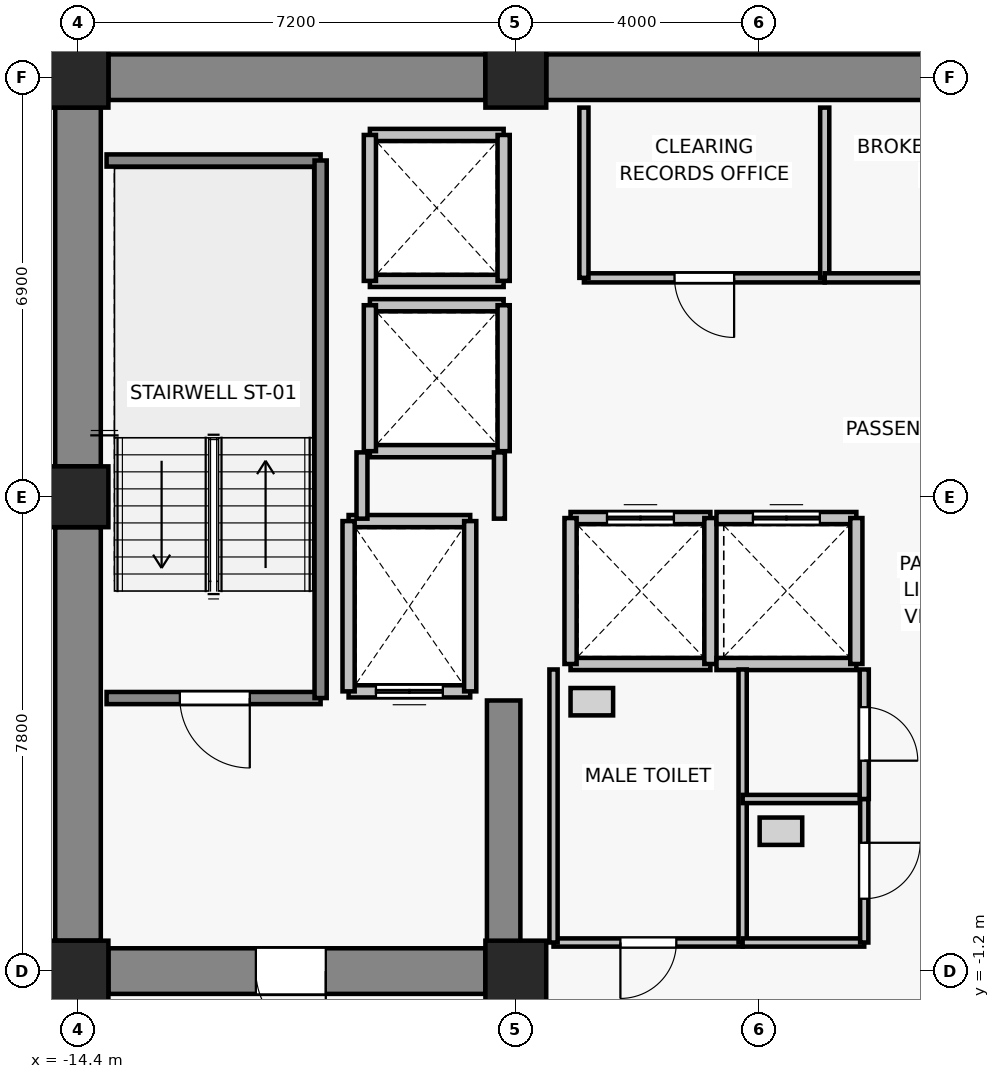
"""IFC4 building model, lengths in metres.
Left out: names, types, materials, properties, quantities, classifications, styles, units other than length and angle.
Written with IfcOpenShell. Run it as: python <this file> out.ifc"""

import sys

from ifc_helpers import new_model, si_unit, direction, frame, frame_2d, origin, origin_2d, place, context, subcontext, project, spatial, rectangle, extrude, source, transform, mapped, element, fill, save


model = new_model("IFC4")
c1 = context("Model", 3, precision=1e-05, world=origin(), true_north=direction((0.0, 1.0)))
c2 = subcontext(c1, "Body", "Model", "MODEL_VIEW")
j1 = project(units=[si_unit("LENGTHUNIT", "METRE"), si_unit("PLANEANGLEUNIT", "RADIAN")], contexts=[c1])
p1 = place(None, origin())
s1 = spatial("IfcSite", under=j1, at=p1, CompositionType="ELEMENT")
p2 = place(p1, origin())
s2 = spatial("IfcBuilding", under=s1, at=p2, CompositionType="ELEMENT")
p3 = place(p2, frame((0.0, 0.0, 119.8)))
s3 = spatial("IfcBuildingStorey", under=s2, at=p3, CompositionType="ELEMENT", Elevation=119.8)
for number, where, z_axis, x_axis in (
    (1, (-14.4, -1.2, 0.0), (0.0, 0.0, 1.0), (1.0, 0.0, 0.0)),
    (2, (-7.2, -1.2, 0.0), (0.0, 0.0, 1.0), (1.0, 0.0, 0.0)),
    (3, (-14.4, 6.6, 0.0), (0.0, 0.0, 1.0), (1.0, 0.0, 0.0)),
    (4, (-14.4, 13.5, 0.0), (0.0, 0.0, 1.0), (1.0, 0.0, 0.0)),
    (5, (-7.2, 13.5, 0.0), (0.0, 0.0, 1.0), (1.0, 0.0, 0.0)),
):
    element("IfcColumn", number, at=place(p3, frame(where, z_axis=z_axis, x_axis=x_axis)), inside=s3, PredefinedType="COLUMN", context=c2, shape_type="SweptSolid", body=[
        extrude(rectangle(XDim=1.0, YDim=1.0, at=origin_2d()), origin(), (0.0, 0.0, 1.0), 3.3),
    ])
p4 = place(p3, frame((-13.9, 13.5, 0.0), z_axis=(0.0, 0.0, 1.0), x_axis=(1.0, 0.0, 0.0)))
e6 = element("IfcWall", 6, at=p4, inside=s3, PredefinedType="SHEAR", context=c2, shape_type="SweptSolid", body=[
    extrude(rectangle(XDim=6.2, YDim=0.75, at=frame_2d((3.1, 0.0))), origin(), (0.0, 0.0, 1.0), 3.075),
])
p5 = place(p3, frame((-6.7, 13.5, 0.0), z_axis=(0.0, 0.0, 1.0), x_axis=(1.0, 0.0, 0.0)))
e7 = element("IfcWall", 7, at=p5, inside=s3, PredefinedType="SHEAR", context=c2, shape_type="SweptSolid", body=[
    extrude(rectangle(XDim=13.4, YDim=0.75, at=frame_2d((6.7, 0.0))), origin(), (0.0, 0.0, 1.0), 3.075),
])
p6 = place(p3, frame((-14.4, -0.7, 0.0), z_axis=(0.0, 0.0, 1.0), x_axis=(0.0, 1.0, 0.0)))
e8 = element("IfcWall", 8, at=p6, inside=s3, PredefinedType="SHEAR", context=c2, shape_type="SweptSolid", body=[
    extrude(rectangle(XDim=6.8, YDim=0.75, at=frame_2d((3.4, 0.0))), origin(), (0.0, 0.0, 1.0), 3.075),
])
p7 = place(p3, frame((-14.4, 7.1, 0.0), z_axis=(0.0, 0.0, 1.0), x_axis=(0.0, 1.0, 0.0)))
e9 = element("IfcWall", 9, at=p7, inside=s3, PredefinedType="SHEAR", context=c2, shape_type="SweptSolid", body=[
    extrude(rectangle(XDim=5.9, YDim=0.75, at=frame_2d((2.95, 0.0))), origin(), (0.0, 0.0, 1.0), 3.075),
])
p8 = place(p3, frame((-7.7, -1.2, 0.0), z_axis=(0.0, 0.0, 1.0), x_axis=(-1.0, 0.0, 0.0)))
e10 = element("IfcWall", 10, at=p8, inside=s3, PredefinedType="SHEAR", context=c2, shape_type="SweptSolid", body=[
    extrude(rectangle(XDim=6.2, YDim=0.75, at=frame_2d((3.1, 0.0))), origin(), (0.0, 0.0, 1.0), 3.075),
])
p9 = place(p8, frame((2.625, 0.0, 0.0)))
e11 = element("IfcOpeningElement", 11, at=p9, cuts=e10, PredefinedType="OPENING", context=c2, shape_type="SweptSolid", body=[
    extrude(rectangle(XDim=1.15, YDim=2.15, at=frame_2d((0.575, 1.075))), frame((0.0, 0.385, 0.0), z_axis=(0.0, -1.0, 0.0), x_axis=(1.0, 0.0, 0.0)), (0.0, 0.0, 1.0), 0.77),
])
p10 = place(p3, frame((-7.4, -0.825, 0.0), z_axis=(0.0, 0.0, 1.0), x_axis=(0.0, 1.0, 0.0)))
e12 = element("IfcWall", 12, at=p10, inside=s3, PredefinedType="SHEAR", context=c2, shape_type="SweptSolid", body=[
    extrude(rectangle(XDim=4.075, YDim=0.55, at=frame_2d((2.038, 0.0))), origin(), (0.0, 0.0, 1.0), 3.075),
])
p11 = place(p3, frame((-7.95, 3.4, 0.0), z_axis=(0.0, 0.0, 1.0), x_axis=(-1.0, 0.0, 0.0)))
e13 = element("IfcWall", 13, at=p11, inside=s3, PredefinedType="SOLIDWALL", context=c2, shape_type="SweptSolid", body=[
    extrude(rectangle(XDim=2.0, YDim=0.2, at=frame_2d((1.0, 0.0))), origin(), (0.0, 0.0, 1.0), 3.075),
])
p12 = place(p11, frame((0.45, 0.0, 0.0)))
e14 = element("IfcOpeningElement", 14, at=p12, cuts=e13, PredefinedType="OPENING", context=c2, shape_type="SweptSolid", body=[
    extrude(rectangle(XDim=1.1, YDim=2.2, at=frame_2d((0.55, 1.1))), frame((0.0, 0.11, 0.0), z_axis=(0.0, -1.0, 0.0), x_axis=(1.0, 0.0, 0.0)), (0.0, 0.0, 1.0), 0.22),
])
p13 = place(p3, frame((-9.95, 6.2, 0.0), z_axis=(0.0, 0.0, 1.0), x_axis=(1.0, 0.0, 0.0)))
e15 = element("IfcWall", 15, at=p13, inside=s3, PredefinedType="SOLIDWALL", context=c2, shape_type="SweptSolid", body=[
    extrude(rectangle(XDim=2.0, YDim=0.2, at=frame_2d((1.0, 0.0))), origin(), (0.0, 0.0, 1.0), 3.075),
])
for number, where, z_axis, x_axis in (
    (16, (-9.95, 3.4, 0.0), (0.0, 0.0, 1.0), (0.0, 1.0, 0.0)),
    (17, (-7.95, 6.2, 0.0), (0.0, 0.0, 1.0), (0.0, -1.0, 0.0)),
):
    element("IfcWall", number, at=place(p3, frame(where, z_axis=z_axis, x_axis=x_axis)), inside=s3, PredefinedType="SOLIDWALL", context=c2, shape_type="SweptSolid", body=[
        extrude(rectangle(XDim=2.8, YDim=0.2, at=frame_2d((1.4, 0.0))), origin(), (0.0, 0.0, 1.0), 3.075),
    ])
p14 = place(p3, frame((-4.0, 3.85, 0.0), z_axis=(0.0, 0.0, 1.0), x_axis=(-1.0, 0.0, 0.0)))
e18 = element("IfcWall", 18, at=p14, inside=s3, PredefinedType="SOLIDWALL", context=c2, shape_type="SweptSolid", body=[
    extrude(rectangle(XDim=2.3, YDim=0.2, at=frame_2d((1.15, 0.0))), origin(), (0.0, 0.0, 1.0), 3.075),
])
p15 = place(p3, frame((-6.3, 6.25, 0.0), z_axis=(0.0, 0.0, 1.0), x_axis=(1.0, 0.0, 0.0)))
e19 = element("IfcWall", 19, at=p15, inside=s3, PredefinedType="SOLIDWALL", context=c2, shape_type="SweptSolid", body=[
    extrude(rectangle(XDim=2.3, YDim=0.2, at=frame_2d((1.15, 0.0))), origin(), (0.0, 0.0, 1.0), 3.075),
])
p16 = place(p15, frame((0.6, 0.0, 0.0)))
e20 = element("IfcOpeningElement", 20, at=p16, cuts=e19, PredefinedType="OPENING", context=c2, shape_type="SweptSolid", body=[
    extrude(rectangle(XDim=1.1, YDim=2.2, at=frame_2d((0.55, 1.1))), frame((0.0, 0.11, 0.0), z_axis=(0.0, -1.0, 0.0), x_axis=(1.0, 0.0, 0.0)), (0.0, 0.0, 1.0), 0.22),
])
for number, where, z_axis, x_axis in (
    (21, (-6.3, 3.85, 0.0), (0.0, 0.0, 1.0), (0.0, 1.0, 0.0)),
    (22, (-4.0, 6.25, 0.0), (0.0, 0.0, 1.0), (0.0, -1.0, 0.0)),
):
    element("IfcWall", number, at=place(p3, frame(where, z_axis=z_axis, x_axis=x_axis)), inside=s3, PredefinedType="SOLIDWALL", context=c2, shape_type="SweptSolid", body=[
        extrude(rectangle(XDim=2.4, YDim=0.2, at=frame_2d((1.2, 0.0))), origin(), (0.0, 0.0, 1.0), 3.075),
    ])
p17 = place(p3, frame((-1.6, 3.85, 0.0), z_axis=(0.0, 0.0, 1.0), x_axis=(-1.0, 0.0, 0.0)))
e23 = element("IfcWall", 23, at=p17, inside=s3, PredefinedType="SOLIDWALL", context=c2, shape_type="SweptSolid", body=[
    extrude(rectangle(XDim=2.3, YDim=0.2, at=frame_2d((1.15, 0.0))), origin(), (0.0, 0.0, 1.0), 3.075),
])
p18 = place(p3, frame((-3.9, 6.25, 0.0), z_axis=(0.0, 0.0, 1.0), x_axis=(1.0, 0.0, 0.0)))
e24 = element("IfcWall", 24, at=p18, inside=s3, PredefinedType="SOLIDWALL", context=c2, shape_type="SweptSolid", body=[
    extrude(rectangle(XDim=2.3, YDim=0.2, at=frame_2d((1.15, 0.0))), origin(), (0.0, 0.0, 1.0), 3.075),
])
p19 = place(p18, frame((0.6, 0.0, 0.0)))
e25 = element("IfcOpeningElement", 25, at=p19, cuts=e24, PredefinedType="OPENING", context=c2, shape_type="SweptSolid", body=[
    extrude(rectangle(XDim=1.1, YDim=2.2, at=frame_2d((0.55, 1.1))), frame((0.0, 0.11, 0.0), z_axis=(0.0, -1.0, 0.0), x_axis=(1.0, 0.0, 0.0)), (0.0, 0.0, 1.0), 0.22),
])
p20 = place(p3, frame((-1.6, 6.25, 0.0), z_axis=(0.0, 0.0, 1.0), x_axis=(0.0, -1.0, 0.0)))
e26 = element("IfcWall", 26, at=p20, inside=s3, PredefinedType="SOLIDWALL", context=c2, shape_type="SweptSolid", body=[
    extrude(rectangle(XDim=2.4, YDim=0.2, at=frame_2d((1.2, 0.0))), origin(), (0.0, 0.0, 1.0), 3.075),
])
for number, where, z_axis, x_axis in (
    (27, (-7.4, 7.35, 0.0), (0.0, 0.0, 1.0), (-1.0, 0.0, 0.0)),
    (28, (-9.6, 9.75, 0.0), (0.0, 0.0, 1.0), (1.0, 0.0, 0.0)),
):
    element("IfcWall", number, at=place(p3, frame(where, z_axis=z_axis, x_axis=x_axis)), inside=s3, PredefinedType="SOLIDWALL", context=c2, shape_type="SweptSolid", body=[
        extrude(rectangle(XDim=2.2, YDim=0.2, at=frame_2d((1.1, 0.0))), origin(), (0.0, 0.0, 1.0), 2.515),
    ])
p21 = place(p3, frame((-9.6, 7.35, 0.0), z_axis=(0.0, 0.0, 1.0), x_axis=(0.0, 1.0, 0.0)))
e29 = element("IfcWall", 29, at=p21, inside=s3, PredefinedType="SOLIDWALL", context=c2, shape_type="SweptSolid", body=[
    extrude(rectangle(XDim=2.4, YDim=0.2, at=frame_2d((1.2, 0.0))), origin(), (0.0, 0.0, 1.0), 3.075),
])
p22 = place(p3, frame((-7.4, 9.75, 0.0), z_axis=(0.0, 0.0, 1.0), x_axis=(0.0, -1.0, 0.0)))
e30 = element("IfcWall", 30, at=p22, inside=s3, PredefinedType="SOLIDWALL", context=c2, shape_type="SweptSolid", body=[
    extrude(rectangle(XDim=2.4, YDim=0.2, at=frame_2d((1.2, 0.0))), origin(), (0.0, 0.0, 1.0), 2.515),
])
for number, where, z_axis, x_axis in (
    (31, (-7.4, 10.15, 0.0), (0.0, 0.0, 1.0), (-1.0, 0.0, 0.0)),
    (32, (-9.6, 12.55, 0.0), (0.0, 0.0, 1.0), (1.0, 0.0, 0.0)),
):
    element("IfcWall", number, at=place(p3, frame(where, z_axis=z_axis, x_axis=x_axis)), inside=s3, PredefinedType="SOLIDWALL", context=c2, shape_type="SweptSolid", body=[
        extrude(rectangle(XDim=2.2, YDim=0.2, at=frame_2d((1.1, 0.0))), origin(), (0.0, 0.0, 1.0), 2.515),
    ])
p23 = place(p3, frame((-9.6, 10.15, 0.0), z_axis=(0.0, 0.0, 1.0), x_axis=(0.0, 1.0, 0.0)))
e33 = element("IfcWall", 33, at=p23, inside=s3, PredefinedType="SOLIDWALL", context=c2, shape_type="SweptSolid", body=[
    extrude(rectangle(XDim=2.4, YDim=0.2, at=frame_2d((1.2, 0.0))), origin(), (0.0, 0.0, 1.0), 3.075),
])
p24 = place(p3, frame((-7.4, 12.55, 0.0), z_axis=(0.0, 0.0, 1.0), x_axis=(0.0, -1.0, 0.0)))
e34 = element("IfcWall", 34, at=p24, inside=s3, PredefinedType="SOLIDWALL", context=c2, shape_type="SweptSolid", body=[
    extrude(rectangle(XDim=2.4, YDim=0.2, at=frame_2d((1.2, 0.0))), origin(), (0.0, 0.0, 1.0), 2.515),
])
p25 = place(p3, frame((-10.41, 3.29, 0.0), z_axis=(0.0, 0.0, 1.0), x_axis=(-1.0, 0.0, 0.0)))
e35 = element("IfcWall", 35, at=p25, inside=s3, PredefinedType="SOLIDWALL", context=c2, shape_type="SweptSolid", body=[
    extrude(rectangle(XDim=3.52, YDim=0.2, at=frame_2d((1.76, 0.0))), origin(), (0.0, 0.0, 1.0), 3.075),
])
p26 = place(p25, frame((1.165, 0.0, 0.0)))
e36 = element("IfcOpeningElement", 36, at=p26, cuts=e35, PredefinedType="OPENING", context=c2, shape_type="SweptSolid", body=[
    extrude(rectangle(XDim=1.15, YDim=2.15, at=frame_2d((0.575, 1.075))), frame((0.0, 0.11, 0.0), z_axis=(0.0, -1.0, 0.0), x_axis=(1.0, 0.0, 0.0)), (0.0, 0.0, 1.0), 0.22),
])
p27 = place(p3, frame((-13.93, 12.13, 0.0), z_axis=(0.0, 0.0, 1.0), x_axis=(1.0, 0.0, 0.0)))
e37 = element("IfcWall", 37, at=p27, inside=s3, PredefinedType="SOLIDWALL", context=c2, shape_type="SweptSolid", body=[
    extrude(rectangle(XDim=3.52, YDim=0.2, at=frame_2d((1.76, 0.0))), origin(), (0.0, 0.0, 1.0), 3.075),
])
p28 = place(p3, frame((-10.41, 12.13, 0.0), z_axis=(0.0, 0.0, 1.0), x_axis=(0.0, -1.0, 0.0)))
e38 = element("IfcWall", 38, at=p28, inside=s3, PredefinedType="SOLIDWALL", context=c2, shape_type="SweptSolid", body=[
    extrude(rectangle(XDim=8.84, YDim=0.2, at=frame_2d((4.42, 0.0))), origin(), (0.0, 0.0, 1.0), 3.075),
])
p29 = place(p3, frame((-9.73, 6.24, 0.0), z_axis=(0.0, 0.0, 1.0), x_axis=(0.0, 1.0, 0.0)))
e39 = element("IfcWall", 39, at=p29, inside=s3, PredefinedType="PARTITIONING", context=c2, shape_type="SweptSolid", body=[
    extrude(rectangle(XDim=1.09, YDim=0.18, at=frame_2d((0.545, 0.0))), origin(), (0.0, 0.0, 1.0), 3.075),
])
p30 = place(p3, frame((-7.47, 7.33, 0.0), z_axis=(0.0, 0.0, 1.0), x_axis=(0.0, -1.0, 0.0)))
e40 = element("IfcWall", 40, at=p30, inside=s3, PredefinedType="PARTITIONING", context=c2, shape_type="SweptSolid", body=[
    extrude(rectangle(XDim=1.09, YDim=0.18, at=frame_2d((0.545, 0.0))), origin(), (0.0, 0.0, 1.0), 2.515),
])
p31 = place(p3, frame((-2.12, 10.2, 0.0), z_axis=(0.0, 0.0, 1.0), x_axis=(-1.0, 0.0, 0.0)))
e41 = element("IfcWall", 41, at=p31, inside=s3, PredefinedType="PARTITIONING", context=c2, shape_type="SweptSolid", body=[
    extrude(rectangle(XDim=3.96, YDim=0.15, at=frame_2d((1.98, 0.0))), origin(), (0.0, 0.0, 1.0), 3.075),
])
p32 = place(p31, frame((1.49, 0.0, 0.0)))
e42 = element("IfcOpeningElement", 42, at=p32, cuts=e41, PredefinedType="OPENING", context=c2, shape_type="SweptSolid", body=[
    extrude(rectangle(XDim=0.98, YDim=2.15, at=frame_2d((0.49, 1.075))), frame((0.0, 0.085, 0.0), z_axis=(0.0, -1.0, 0.0), x_axis=(1.0, 0.0, 0.0)), (0.0, 0.0, 1.0), 0.17),
])
for number, where, z_axis, x_axis in (
    (43, (-6.08, 10.2, 0.0), (0.0, 0.0, 1.0), (0.0, 1.0, 0.0)),
    (44, (-2.12, 13.0, 0.0), (0.0, 0.0, 1.0), (0.0, -1.0, 0.0)),
):
    element("IfcWall", number, at=place(p3, frame(where, z_axis=z_axis, x_axis=x_axis)), inside=s3, PredefinedType="PARTITIONING", context=c2, shape_type="SweptSolid", body=[
        extrude(rectangle(XDim=2.8, YDim=0.15, at=frame_2d((1.4, 0.0))), origin(), (0.0, 0.0, 1.0), 3.075),
    ])
p33 = place(p3, frame((2.04, 10.2, 0.0), z_axis=(0.0, 0.0, 1.0), x_axis=(-1.0, 0.0, 0.0)))
e45 = element("IfcWall", 45, at=p33, inside=s3, PredefinedType="PARTITIONING", context=c2, shape_type="SweptSolid", body=[
    extrude(rectangle(XDim=4.16, YDim=0.15, at=frame_2d((2.08, 0.0))), origin(), (0.0, 0.0, 1.0), 3.075),
])
p34 = place(p33, frame((1.55, 0.0, 0.0)))
e46 = element("IfcOpeningElement", 46, at=p34, cuts=e45, PredefinedType="OPENING", context=c2, shape_type="SweptSolid", body=[
    extrude(rectangle(XDim=0.98, YDim=2.15, at=frame_2d((0.49, 1.075))), frame((0.0, 0.085, 0.0), z_axis=(0.0, -1.0, 0.0), x_axis=(1.0, 0.0, 0.0)), (0.0, 0.0, 1.0), 0.17),
])
p35 = place(p3, frame((-3.47, -0.73, 0.0), z_axis=(0.0, 0.0, 1.0), x_axis=(-1.0, 0.0, 0.0)))
e47 = element("IfcWall", 47, at=p35, inside=s3, PredefinedType="PARTITIONING", context=c2, shape_type="SweptSolid", body=[
    extrude(rectangle(XDim=3.11, YDim=0.135, at=frame_2d((1.555, 0.0))), origin(), (0.0, 0.0, 1.0), 3.075),
])
p36 = place(p35, frame((1.09, 0.0, 0.0)))
e48 = element("IfcOpeningElement", 48, at=p36, cuts=e47, PredefinedType="OPENING", context=c2, shape_type="SweptSolid", body=[
    extrude(rectangle(XDim=0.92, YDim=2.1, at=frame_2d((0.46, 1.05))), frame((0.0, 0.077, 0.0), z_axis=(0.0, -1.0, 0.0), x_axis=(1.0, 0.0, 0.0)), (0.0, 0.0, 1.0), 0.155),
])
for number, where, z_axis, x_axis in (
    (49, (-6.58, -0.73, 0.0), (0.0, 0.0, 1.0), (0.0, 1.0, 0.0)),
    (50, (-3.47, 3.76, 0.0), (0.0, 0.0, 1.0), (0.0, -1.0, 0.0)),
):
    element("IfcWall", number, at=place(p3, frame(where, z_axis=z_axis, x_axis=x_axis)), inside=s3, PredefinedType="PARTITIONING", context=c2, shape_type="SweptSolid", body=[
        extrude(rectangle(XDim=4.49, YDim=0.135, at=frame_2d((2.245, 0.0))), origin(), (0.0, 0.0, 1.0), 3.075),
    ])
for number, where, z_axis, x_axis in (
    (51, (-1.47, -0.73, 0.0), (0.0, 0.0, 1.0), (-1.0, 0.0, 0.0)),
    (52, (-3.47, 1.63, 0.0), (0.0, 0.0, 1.0), (1.0, 0.0, 0.0)),
):
    element("IfcWall", number, at=place(p3, frame(where, z_axis=z_axis, x_axis=x_axis)), inside=s3, PredefinedType="PARTITIONING", context=c2, shape_type="SweptSolid", body=[
        extrude(rectangle(XDim=2.0, YDim=0.135, at=frame_2d((1.0, 0.0))), origin(), (0.0, 0.0, 1.0), 3.075),
    ])
p37 = place(p3, frame((-1.47, 1.63, 0.0), z_axis=(0.0, 0.0, 1.0), x_axis=(0.0, -1.0, 0.0)))
e53 = element("IfcWall", 53, at=p37, inside=s3, PredefinedType="PARTITIONING", context=c2, shape_type="SweptSolid", body=[
    extrude(rectangle(XDim=2.36, YDim=0.135, at=frame_2d((1.18, 0.0))), origin(), (0.0, 0.0, 1.0), 3.075),
])
p38 = place(p37, frame((0.72, 0.0, 0.0)))
e54 = element("IfcOpeningElement", 54, at=p38, cuts=e53, PredefinedType="OPENING", context=c2, shape_type="SweptSolid", body=[
    extrude(rectangle(XDim=0.92, YDim=2.1, at=frame_2d((0.46, 1.05))), frame((0.0, 0.077, 0.0), z_axis=(0.0, -1.0, 0.0), x_axis=(1.0, 0.0, 0.0)), (0.0, 0.0, 1.0), 0.155),
])
p39 = place(p3, frame((-1.47, 3.76, 0.0), z_axis=(0.0, 0.0, 1.0), x_axis=(0.0, -1.0, 0.0)))
e55 = element("IfcWall", 55, at=p39, inside=s3, PredefinedType="PARTITIONING", context=c2, shape_type="SweptSolid", body=[
    extrude(rectangle(XDim=2.13, YDim=0.15, at=frame_2d((1.065, 0.0))), origin(), (0.0, 0.0, 1.0), 3.075),
])
p40 = place(p39, frame((0.62, 0.0, 0.0)))
e56 = element("IfcOpeningElement", 56, at=p40, cuts=e55, PredefinedType="OPENING", context=c2, shape_type="SweptSolid", body=[
    extrude(rectangle(XDim=0.88, YDim=2.1, at=frame_2d((0.44, 1.05))), frame((0.0, 0.085, 0.0), z_axis=(0.0, -1.0, 0.0), x_axis=(1.0, 0.0, 0.0)), (0.0, 0.0, 1.0), 0.17),
])
m1 = source(origin(), c2, "Body", "SweptSolid", [
    extrude(rectangle(XDim=1.1, YDim=2.2, at=frame_2d((0.55, 1.1))), frame((0.0, 0.025, 0.0), z_axis=(0.0, -1.0, 0.0), x_axis=(1.0, 0.0, 0.0)), (0.0, 0.0, 1.0), 0.05),
])
p41 = place(p12, origin())
e57 = element("IfcDoor", 57, at=p41, inside=s3, OperationType="DOUBLE_DOOR_SLIDING", PredefinedType="DOOR", context=c2, shape_type="MappedRepresentation", body=[
    mapped(m1, transform((0.0, 0.0, 0.0), x_axis=(1.0, 0.0, 0.0), y_axis=(0.0, 1.0, 0.0), z_axis=(0.0, 0.0, 1.0), scale=1.0)),
])
fill(e14, e57)
p42 = place(p16, origin())
e58 = element("IfcDoor", 58, at=p42, inside=s3, OperationType="DOUBLE_DOOR_SLIDING", PredefinedType="DOOR", context=c2, shape_type="MappedRepresentation", body=[
    mapped(m1, transform((0.0, 0.0, 0.0), x_axis=(1.0, 0.0, 0.0), y_axis=(0.0, 1.0, 0.0), z_axis=(0.0, 0.0, 1.0), scale=1.0)),
])
fill(e20, e58)
p43 = place(p19, origin())
e59 = element("IfcDoor", 59, at=p43, inside=s3, OperationType="DOUBLE_DOOR_SLIDING", PredefinedType="DOOR", context=c2, shape_type="MappedRepresentation", body=[
    mapped(m1, transform((0.0, 0.0, 0.0), x_axis=(1.0, 0.0, 0.0), y_axis=(0.0, 1.0, 0.0), z_axis=(0.0, 0.0, 1.0), scale=1.0)),
])
fill(e25, e59)
m2 = source(origin(), c2, "Body", "SweptSolid", [
    extrude(rectangle(XDim=1.15, YDim=2.15, at=frame_2d((0.575, 1.075))), frame((0.0, 0.025, 0.0), z_axis=(0.0, -1.0, 0.0), x_axis=(1.0, 0.0, 0.0)), (0.0, 0.0, 1.0), 0.05),
])
p44 = place(p26, origin())
e60 = element("IfcDoor", 60, at=p44, inside=s3, OperationType="SINGLE_SWING_LEFT", PredefinedType="DOOR", context=c2, shape_type="MappedRepresentation", body=[
    mapped(m2, transform((0.0, 0.0, 0.0), x_axis=(1.0, 0.0, 0.0), y_axis=(0.0, 1.0, 0.0), z_axis=(0.0, 0.0, 1.0), scale=1.0)),
])
fill(e36, e60)
p45 = place(p9, origin())
e61 = element("IfcDoor", 61, at=p45, inside=s3, OperationType="SINGLE_SWING_LEFT", PredefinedType="DOOR", context=c2, shape_type="MappedRepresentation", body=[
    mapped(m2, transform((0.0, 0.0, 0.0), x_axis=(1.0, 0.0, 0.0), y_axis=(0.0, 1.0, 0.0), z_axis=(0.0, 0.0, 1.0), scale=1.0)),
])
fill(e11, e61)
m3 = source(origin(), c2, "Body", "SweptSolid", [
    extrude(rectangle(XDim=0.98, YDim=2.15, at=frame_2d((0.49, 1.075))), frame((0.0, 0.025, 0.0), z_axis=(0.0, -1.0, 0.0), x_axis=(1.0, 0.0, 0.0)), (0.0, 0.0, 1.0), 0.05),
])
p46 = place(p32, origin())
e62 = element("IfcDoor", 62, at=p46, inside=s3, OperationType="SINGLE_SWING_LEFT", PredefinedType="DOOR", context=c2, shape_type="MappedRepresentation", body=[
    mapped(m3, transform((0.0, 0.0, 0.0), x_axis=(1.0, 0.0, 0.0), y_axis=(0.0, 1.0, 0.0), z_axis=(0.0, 0.0, 1.0), scale=1.0)),
])
fill(e42, e62)
m4 = source(origin(), c2, "Body", "SweptSolid", [
    extrude(rectangle(XDim=0.92, YDim=2.1, at=frame_2d((0.46, 1.05))), frame((0.0, 0.025, 0.0), z_axis=(0.0, -1.0, 0.0), x_axis=(1.0, 0.0, 0.0)), (0.0, 0.0, 1.0), 0.05),
])
p47 = place(p36, origin())
e63 = element("IfcDoor", 63, at=p47, inside=s3, OperationType="SINGLE_SWING_RIGHT", PredefinedType="DOOR", context=c2, shape_type="MappedRepresentation", body=[
    mapped(m4, transform((0.0, 0.0, 0.0), x_axis=(1.0, 0.0, 0.0), y_axis=(0.0, 1.0, 0.0), z_axis=(0.0, 0.0, 1.0), scale=1.0)),
])
fill(e48, e63)
p48 = place(p38, origin())
e64 = element("IfcDoor", 64, at=p48, inside=s3, OperationType="SINGLE_SWING_LEFT", PredefinedType="DOOR", context=c2, shape_type="MappedRepresentation", body=[
    mapped(m4, transform((0.0, 0.0, 0.0), x_axis=(1.0, 0.0, 0.0), y_axis=(0.0, 1.0, 0.0), z_axis=(0.0, 0.0, 1.0), scale=1.0)),
])
fill(e54, e64)
m5 = source(origin(), c2, "Body", "SweptSolid", [
    extrude(rectangle(XDim=0.88, YDim=2.1, at=frame_2d((0.44, 1.05))), frame((0.0, 0.025, 0.0), z_axis=(0.0, -1.0, 0.0), x_axis=(1.0, 0.0, 0.0)), (0.0, 0.0, 1.0), 0.05),
])
p49 = place(p40, origin())
e65 = element("IfcDoor", 65, at=p49, inside=s3, OperationType="SINGLE_SWING_RIGHT", PredefinedType="DOOR", context=c2, shape_type="MappedRepresentation", body=[
    mapped(m5, transform((0.0, 0.0, 0.0), x_axis=(1.0, 0.0, 0.0), y_axis=(0.0, 1.0, 0.0), z_axis=(0.0, 0.0, 1.0), scale=1.0)),
])
fill(e56, e65)
save(model, sys.argv[1])
